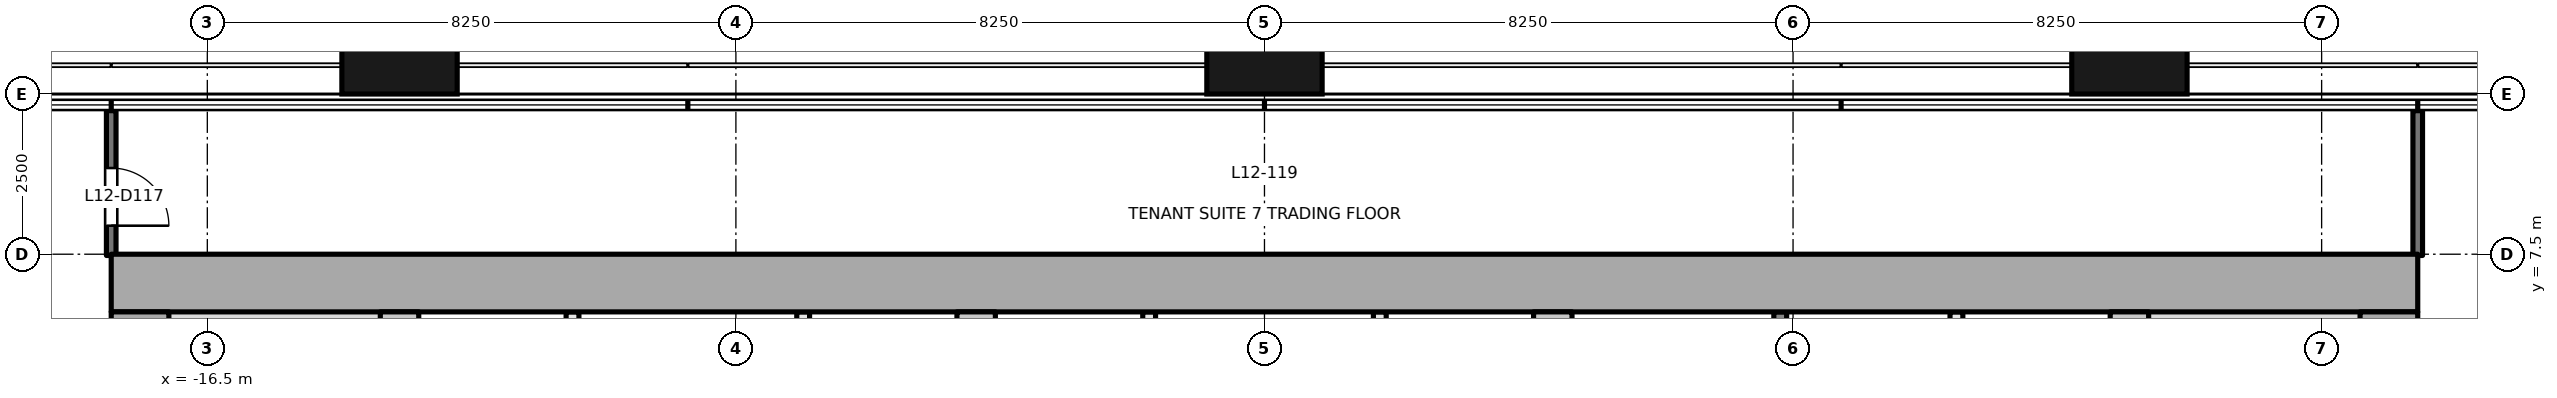
"""IFC4 building model, lengths in metres.
Left out: names, types, materials, properties, quantities, classifications, styles, units other than length and angle.
Written with IfcOpenShell. Run it as: python <this file> out.ifc"""

import sys

from ifc_helpers import new_model, si_unit, direction, frame, frame_2d, origin, origin_2d, place, context, subcontext, project, spatial, rectangle, extrude, element, fill, save


model = new_model("IFC4")
c1 = context("Model", 3, precision=1e-05, world=origin(), true_north=direction((0.0, 1.0)))
c2 = subcontext(c1, "Body", "Model", "MODEL_VIEW")
j1 = project(units=[si_unit("LENGTHUNIT", "METRE"), si_unit("PLANEANGLEUNIT", "RADIAN")], contexts=[c1])
p1 = place(None, origin())
s1 = spatial("IfcSite", under=j1, at=p1, CompositionType="ELEMENT")
p2 = place(p1, origin())
s2 = spatial("IfcBuilding", under=s1, at=p2, CompositionType="ELEMENT")
p3 = place(p2, frame((0.0, 0.0, 57.0)))
s3 = spatial("IfcBuildingStorey", under=s2, at=p3, CompositionType="ELEMENT", Elevation=57.0)
for number, where, z_axis, x_axis in (
    (1, (-13.5, 10.9, -0.2), (0.0, 0.0, 1.0), (1.0, 0.0, 0.0)),
    (2, (0.0, 10.9, -0.2), (0.0, 0.0, 1.0), (1.0, 0.0, 0.0)),
    (3, (13.5, 10.9, -0.2), (0.0, 0.0, 1.0), (1.0, 0.0, 0.0)),
):
    element("IfcColumn", number, at=place(p3, frame(where, z_axis=z_axis, x_axis=x_axis)), inside=s3, PredefinedType="COLUMN", context=c2, shape_type="SweptSolid", body=[
        extrude(rectangle(XDim=1.8, YDim=1.8, at=origin_2d()), origin(), (0.0, 0.0, 1.0), 4.1),
    ])
p4 = place(p3, frame((-18.0, 7.05, -0.2), z_axis=(0.0, 0.0, 1.0), x_axis=(1.0, 0.0, 0.0)))
e4 = element("IfcWall", 4, at=p4, inside=s3, PredefinedType="SHEAR", context=c2, shape_type="SweptSolid", body=[
    extrude(rectangle(XDim=36.0, YDim=0.9, at=frame_2d((18.0, 0.0))), origin(), (0.0, 0.0, 1.0), 4.1),
])
p5 = place(p3, frame((-17.55, -6.6, -0.2), z_axis=(0.0, 0.0, 1.0), x_axis=(0.0, 1.0, 0.0)))
e5 = element("IfcWall", 5, at=p5, inside=s3, PredefinedType="SHEAR", context=c2, shape_type="SweptSolid", body=[
    extrude(rectangle(XDim=13.2, YDim=0.9, at=frame_2d((6.6, 0.0))), origin(), (0.0, 0.0, 1.0), 4.1),
])
p6 = place(p5, frame((4.55, 0.0, 0.2)))
e6 = element("IfcOpeningElement", 6, at=p6, cuts=e5, PredefinedType="OPENING", context=c2, shape_type="SweptSolid", body=[
    extrude(rectangle(XDim=1.2, YDim=2.1, at=frame_2d((0.6, 1.05))), frame((0.0, 0.46, 0.0), z_axis=(0.0, -1.0, 0.0), x_axis=(1.0, 0.0, 0.0)), (0.0, 0.0, 1.0), 0.921),
])
p7 = place(p3, frame((17.55, -6.6, -0.2), z_axis=(0.0, 0.0, 1.0), x_axis=(0.0, 1.0, 0.0)))
e7 = element("IfcWall", 7, at=p7, inside=s3, PredefinedType="SHEAR", context=c2, shape_type="SweptSolid", body=[
    extrude(rectangle(XDim=13.2, YDim=0.9, at=frame_2d((6.6, 0.0))), origin(), (0.0, 0.0, 1.0), 4.1),
])
p8 = place(p7, frame((4.55, 0.0, 0.2)))
e8 = element("IfcOpeningElement", 8, at=p8, cuts=e7, PredefinedType="OPENING", context=c2, shape_type="SweptSolid", body=[
    extrude(rectangle(XDim=1.2, YDim=2.1, at=frame_2d((0.6, 1.05))), frame((0.0, 0.46, 0.0), z_axis=(0.0, -1.0, 0.0), x_axis=(1.0, 0.0, 0.0)), (0.0, 0.0, 1.0), 0.921),
])
for number, where, z_axis, x_axis in (
    (9, (-13.5, -6.6, -0.2), (0.0, 0.0, 1.0), (0.0, 1.0, 0.0)),
    (10, (-4.5, -6.6, -0.2), (0.0, 0.0, 1.0), (0.0, 1.0, 0.0)),
    (11, (4.5, -6.6, -0.2), (0.0, 0.0, 1.0), (0.0, 1.0, 0.0)),
    (12, (13.5, -6.6, -0.2), (0.0, 0.0, 1.0), (0.0, 1.0, 0.0)),
):
    element("IfcWall", number, at=place(p3, frame(where, z_axis=z_axis, x_axis=x_axis)), inside=s3, PredefinedType="SHEAR", context=c2, shape_type="SweptSolid", body=[
        extrude(rectangle(XDim=13.2, YDim=0.6, at=frame_2d((6.6, 0.0))), origin(), (0.0, 0.0, 1.0), 4.1),
    ])
p9 = place(p3, frame((-10.8, -6.6, 0.0), z_axis=(0.0, 0.0, 1.0), x_axis=(0.0, 1.0, 0.0)))
e13 = element("IfcWall", 13, at=p9, inside=s3, PredefinedType="PARTITIONING", context=c2, shape_type="SweptSolid", body=[
    extrude(rectangle(XDim=13.2, YDim=0.2, at=frame_2d((6.6, 0.0))), origin(), (0.0, 0.0, 1.0), 3.9),
])
p10 = place(p9, frame((0.55, 0.0, 0.0)))
e14 = element("IfcOpeningElement", 14, at=p10, cuts=e13, PredefinedType="OPENING", context=c2, shape_type="SweptSolid", body=[
    extrude(rectangle(XDim=0.9, YDim=2.1, at=frame_2d((0.45, 1.05))), frame((0.0, 0.111, 0.0), z_axis=(0.0, -1.0, 0.0), x_axis=(1.0, 0.0, 0.0)), (0.0, 0.0, 1.0), 0.221),
])
p11 = place(p9, frame((2.9, 0.0, 0.0)))
e15 = element("IfcOpeningElement", 15, at=p11, cuts=e13, PredefinedType="OPENING", context=c2, shape_type="SweptSolid", body=[
    extrude(rectangle(XDim=1.2, YDim=2.1, at=frame_2d((0.6, 1.05))), frame((0.0, 0.111, 0.0), z_axis=(0.0, -1.0, 0.0), x_axis=(1.0, 0.0, 0.0)), (0.0, 0.0, 1.0), 0.221),
])
p12 = place(p9, frame((5.7, 0.0, 0.0)))
e16 = element("IfcOpeningElement", 16, at=p12, cuts=e13, PredefinedType="OPENING", context=c2, shape_type="SweptSolid", body=[
    extrude(rectangle(XDim=1.2, YDim=2.1, at=frame_2d((0.6, 1.05))), frame((0.0, 0.111, 0.0), z_axis=(0.0, -1.0, 0.0), x_axis=(1.0, 0.0, 0.0)), (0.0, 0.0, 1.0), 0.221),
])
p13 = place(p9, frame((8.5, 0.0, 0.0)))
e17 = element("IfcOpeningElement", 17, at=p13, cuts=e13, PredefinedType="OPENING", context=c2, shape_type="SweptSolid", body=[
    extrude(rectangle(XDim=1.2, YDim=2.1, at=frame_2d((0.6, 1.05))), frame((0.0, 0.111, 0.0), z_axis=(0.0, -1.0, 0.0), x_axis=(1.0, 0.0, 0.0)), (0.0, 0.0, 1.0), 0.221),
])
p14 = place(p9, frame((11.3, 0.0, 0.0)))
e18 = element("IfcOpeningElement", 18, at=p14, cuts=e13, PredefinedType="OPENING", context=c2, shape_type="SweptSolid", body=[
    extrude(rectangle(XDim=1.2, YDim=2.1, at=frame_2d((0.6, 1.05))), frame((0.0, 0.111, 0.0), z_axis=(0.0, -1.0, 0.0), x_axis=(1.0, 0.0, 0.0)), (0.0, 0.0, 1.0), 0.221),
])
p15 = place(p3, frame((-7.2, -6.6, 0.0), z_axis=(0.0, 0.0, 1.0), x_axis=(0.0, 1.0, 0.0)))
e19 = element("IfcWall", 19, at=p15, inside=s3, PredefinedType="PARTITIONING", context=c2, shape_type="SweptSolid", body=[
    extrude(rectangle(XDim=13.2, YDim=0.2, at=frame_2d((6.6, 0.0))), origin(), (0.0, 0.0, 1.0), 3.9),
])
p16 = place(p15, frame((0.55, 0.0, 0.0)))
e20 = element("IfcOpeningElement", 20, at=p16, cuts=e19, PredefinedType="OPENING", context=c2, shape_type="SweptSolid", body=[
    extrude(rectangle(XDim=0.9, YDim=2.1, at=frame_2d((0.45, 1.05))), frame((0.0, 0.111, 0.0), z_axis=(0.0, -1.0, 0.0), x_axis=(1.0, 0.0, 0.0)), (0.0, 0.0, 1.0), 0.221),
])
p17 = place(p15, frame((2.9, 0.0, 0.0)))
e21 = element("IfcOpeningElement", 21, at=p17, cuts=e19, PredefinedType="OPENING", context=c2, shape_type="SweptSolid", body=[
    extrude(rectangle(XDim=1.2, YDim=2.1, at=frame_2d((0.6, 1.05))), frame((0.0, 0.111, 0.0), z_axis=(0.0, -1.0, 0.0), x_axis=(1.0, 0.0, 0.0)), (0.0, 0.0, 1.0), 0.221),
])
p18 = place(p15, frame((5.7, 0.0, 0.0)))
e22 = element("IfcOpeningElement", 22, at=p18, cuts=e19, PredefinedType="OPENING", context=c2, shape_type="SweptSolid", body=[
    extrude(rectangle(XDim=1.2, YDim=2.1, at=frame_2d((0.6, 1.05))), frame((0.0, 0.111, 0.0), z_axis=(0.0, -1.0, 0.0), x_axis=(1.0, 0.0, 0.0)), (0.0, 0.0, 1.0), 0.221),
])
p19 = place(p15, frame((8.5, 0.0, 0.0)))
e23 = element("IfcOpeningElement", 23, at=p19, cuts=e19, PredefinedType="OPENING", context=c2, shape_type="SweptSolid", body=[
    extrude(rectangle(XDim=1.2, YDim=2.1, at=frame_2d((0.6, 1.05))), frame((0.0, 0.111, 0.0), z_axis=(0.0, -1.0, 0.0), x_axis=(1.0, 0.0, 0.0)), (0.0, 0.0, 1.0), 0.221),
])
p20 = place(p15, frame((11.3, 0.0, 0.0)))
e24 = element("IfcOpeningElement", 24, at=p20, cuts=e19, PredefinedType="OPENING", context=c2, shape_type="SweptSolid", body=[
    extrude(rectangle(XDim=1.2, YDim=2.1, at=frame_2d((0.6, 1.05))), frame((0.0, 0.111, 0.0), z_axis=(0.0, -1.0, 0.0), x_axis=(1.0, 0.0, 0.0)), (0.0, 0.0, 1.0), 0.221),
])
p21 = place(p3, frame((-1.8, -6.6, 0.0), z_axis=(0.0, 0.0, 1.0), x_axis=(0.0, 1.0, 0.0)))
e25 = element("IfcWall", 25, at=p21, inside=s3, PredefinedType="PARTITIONING", context=c2, shape_type="SweptSolid", body=[
    extrude(rectangle(XDim=13.2, YDim=0.2, at=frame_2d((6.6, 0.0))), origin(), (0.0, 0.0, 1.0), 3.9),
])
p22 = place(p21, frame((0.55, 0.0, 0.0)))
e26 = element("IfcOpeningElement", 26, at=p22, cuts=e25, PredefinedType="OPENING", context=c2, shape_type="SweptSolid", body=[
    extrude(rectangle(XDim=0.9, YDim=2.1, at=frame_2d((0.45, 1.05))), frame((0.0, 0.111, 0.0), z_axis=(0.0, -1.0, 0.0), x_axis=(1.0, 0.0, 0.0)), (0.0, 0.0, 1.0), 0.221),
])
p23 = place(p3, frame((1.8, -6.6, 0.0), z_axis=(0.0, 0.0, 1.0), x_axis=(0.0, 1.0, 0.0)))
e27 = element("IfcWall", 27, at=p23, inside=s3, PredefinedType="PARTITIONING", context=c2, shape_type="SweptSolid", body=[
    extrude(rectangle(XDim=13.2, YDim=0.2, at=frame_2d((6.6, 0.0))), origin(), (0.0, 0.0, 1.0), 3.9),
])
p24 = place(p23, frame((0.55, 0.0, 0.0)))
e28 = element("IfcOpeningElement", 28, at=p24, cuts=e27, PredefinedType="OPENING", context=c2, shape_type="SweptSolid", body=[
    extrude(rectangle(XDim=0.9, YDim=2.1, at=frame_2d((0.45, 1.05))), frame((0.0, 0.111, 0.0), z_axis=(0.0, -1.0, 0.0), x_axis=(1.0, 0.0, 0.0)), (0.0, 0.0, 1.0), 0.221),
])
p25 = place(p3, frame((8.05, -6.6, 0.0), z_axis=(0.0, 0.0, 1.0), x_axis=(0.0, 1.0, 0.0)))
e29 = element("IfcWall", 29, at=p25, inside=s3, PredefinedType="PARTITIONING", context=c2, shape_type="SweptSolid", body=[
    extrude(rectangle(XDim=13.2, YDim=0.2, at=frame_2d((6.6, 0.0))), origin(), (0.0, 0.0, 1.0), 3.9),
])
p26 = place(p25, frame((0.298, 0.0, 0.0)))
e30 = element("IfcOpeningElement", 30, at=p26, cuts=e29, PredefinedType="OPENING", context=c2, shape_type="SweptSolid", body=[
    extrude(rectangle(XDim=0.9, YDim=2.1, at=frame_2d((0.45, 1.05))), frame((0.0, 0.111, 0.0), z_axis=(0.0, -1.0, 0.0), x_axis=(1.0, 0.0, 0.0)), (0.0, 0.0, 1.0), 0.221),
])
p27 = place(p25, frame((2.066, 0.0, 0.0)))
e31 = element("IfcOpeningElement", 31, at=p27, cuts=e29, PredefinedType="OPENING", context=c2, shape_type="SweptSolid", body=[
    extrude(rectangle(XDim=0.9, YDim=2.1, at=frame_2d((0.45, 1.05))), frame((0.0, 0.111, 0.0), z_axis=(0.0, -1.0, 0.0), x_axis=(1.0, 0.0, 0.0)), (0.0, 0.0, 1.0), 0.221),
])
p28 = place(p25, frame((3.834, 0.0, 0.0)))
e32 = element("IfcOpeningElement", 32, at=p28, cuts=e29, PredefinedType="OPENING", context=c2, shape_type="SweptSolid", body=[
    extrude(rectangle(XDim=0.9, YDim=2.1, at=frame_2d((0.45, 1.05))), frame((0.0, 0.111, 0.0), z_axis=(0.0, -1.0, 0.0), x_axis=(1.0, 0.0, 0.0)), (0.0, 0.0, 1.0), 0.221),
])
p29 = place(p25, frame((5.466, 0.0, 0.0)))
e33 = element("IfcOpeningElement", 33, at=p29, cuts=e29, PredefinedType="OPENING", context=c2, shape_type="SweptSolid", body=[
    extrude(rectangle(XDim=0.9, YDim=2.1, at=frame_2d((0.45, 1.05))), frame((0.0, 0.111, 0.0), z_axis=(0.0, -1.0, 0.0), x_axis=(1.0, 0.0, 0.0)), (0.0, 0.0, 1.0), 0.221),
])
p30 = place(p25, frame((11.9, 0.0, 0.0)))
e34 = element("IfcOpeningElement", 34, at=p30, cuts=e29, PredefinedType="OPENING", context=c2, shape_type="SweptSolid", body=[
    extrude(rectangle(XDim=1.1, YDim=2.1, at=frame_2d((0.55, 1.05))), frame((0.0, 0.111, 0.0), z_axis=(0.0, -1.0, 0.0), x_axis=(1.0, 0.0, 0.0)), (0.0, 0.0, 1.0), 0.221),
])
p31 = place(p3, frame((10.8, -6.6, 0.0), z_axis=(0.0, 0.0, 1.0), x_axis=(0.0, 1.0, 0.0)))
e35 = element("IfcWall", 35, at=p31, inside=s3, PredefinedType="PARTITIONING", context=c2, shape_type="SweptSolid", body=[
    extrude(rectangle(XDim=13.2, YDim=0.2, at=frame_2d((6.6, 0.0))), origin(), (0.0, 0.0, 1.0), 3.9),
])
p32 = place(p31, frame((0.7, 0.0, 0.0)))
e36 = element("IfcOpeningElement", 36, at=p32, cuts=e35, PredefinedType="OPENING", context=c2, shape_type="SweptSolid", body=[
    extrude(rectangle(XDim=1.2, YDim=2.1, at=frame_2d((0.6, 1.05))), frame((0.0, 0.111, 0.0), z_axis=(0.0, -1.0, 0.0), x_axis=(1.0, 0.0, 0.0)), (0.0, 0.0, 1.0), 0.221),
])
p33 = place(p31, frame((8.67, 0.0, 0.0)))
e37 = element("IfcOpeningElement", 37, at=p33, cuts=e35, PredefinedType="OPENING", context=c2, shape_type="SweptSolid", body=[
    extrude(rectangle(XDim=0.9, YDim=2.1, at=frame_2d((0.45, 1.05))), frame((0.0, 0.111, 0.0), z_axis=(0.0, -1.0, 0.0), x_axis=(1.0, 0.0, 0.0)), (0.0, 0.0, 1.0), 0.221),
])
p34 = place(p31, frame((10.11, 0.0, 0.0)))
e38 = element("IfcOpeningElement", 38, at=p34, cuts=e35, PredefinedType="OPENING", context=c2, shape_type="SweptSolid", body=[
    extrude(rectangle(XDim=0.9, YDim=2.1, at=frame_2d((0.45, 1.05))), frame((0.0, 0.111, 0.0), z_axis=(0.0, -1.0, 0.0), x_axis=(1.0, 0.0, 0.0)), (0.0, 0.0, 1.0), 0.221),
])
p35 = place(p31, frame((11.79, 0.0, 0.0)))
e39 = element("IfcOpeningElement", 39, at=p35, cuts=e35, PredefinedType="OPENING", context=c2, shape_type="SweptSolid", body=[
    extrude(rectangle(XDim=0.9, YDim=2.1, at=frame_2d((0.45, 1.05))), frame((0.0, 0.111, 0.0), z_axis=(0.0, -1.0, 0.0), x_axis=(1.0, 0.0, 0.0)), (0.0, 0.0, 1.0), 0.221),
])
p36 = place(p3, frame((-18.0, 9.74, 0.0), z_axis=(0.0, 0.0, 1.0), x_axis=(0.0, -1.0, 0.0)))
e40 = element("IfcWall", 40, at=p36, inside=s3, PredefinedType="PARTITIONING", context=c2, shape_type="SweptSolid", body=[
    extrude(rectangle(XDim=2.26, YDim=0.15, at=frame_2d((1.13, 0.0))), origin(), (0.0, 0.0, 1.0), 2.9),
])
p37 = place(p36, frame((0.895, 0.0, 0.0)))
e41 = element("IfcOpeningElement", 41, at=p37, cuts=e40, PredefinedType="OPENING", context=c2, shape_type="SweptSolid", body=[
    extrude(rectangle(XDim=0.9, YDim=2.1, at=frame_2d((0.45, 1.05))), frame((0.0, 0.085, 0.0), z_axis=(0.0, -1.0, 0.0), x_axis=(1.0, 0.0, 0.0)), (0.0, 0.0, 1.0), 0.171),
])
p38 = place(p3, frame((18.0, 7.48, 0.0), z_axis=(0.0, 0.0, 1.0), x_axis=(0.0, 1.0, 0.0)))
e42 = element("IfcWall", 42, at=p38, inside=s3, PredefinedType="PARTITIONING", context=c2, shape_type="SweptSolid", body=[
    extrude(rectangle(XDim=2.26, YDim=0.15, at=frame_2d((1.13, 0.0))), origin(), (0.0, 0.0, 1.0), 2.9),
])
p39 = place(p37, origin())
e43 = element("IfcDoor", 43, at=p39, inside=s3, OperationType="SINGLE_SWING_RIGHT", PredefinedType="DOOR", context=c2, shape_type="SweptSolid", body=[
    extrude(rectangle(XDim=0.9, YDim=2.1, at=frame_2d((0.45, 1.05))), frame((0.0, 0.025, 0.0), z_axis=(0.0, -1.0, 0.0), x_axis=(1.0, 0.0, 0.0)), (0.0, 0.0, 1.0), 0.05),
])
fill(e41, e43)
save(model, sys.argv[1])
